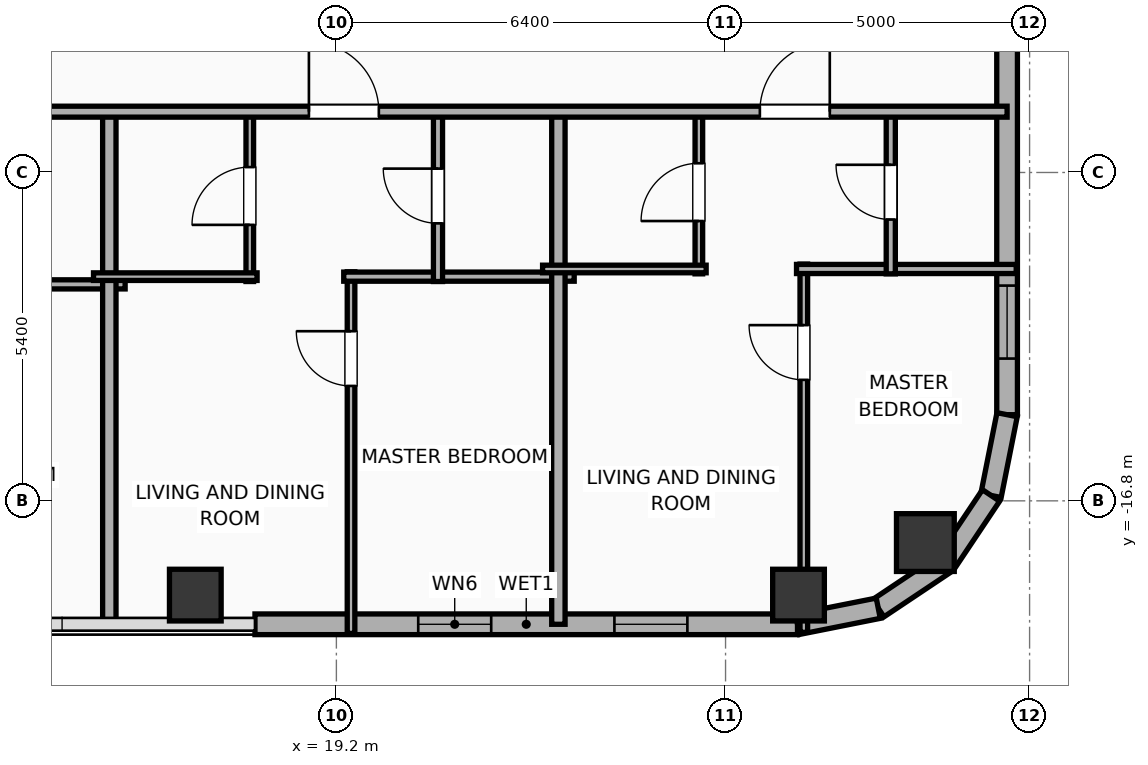
"""IFC4 building model, lengths in metres.
Left out: names, types, materials, properties, quantities, classifications, styles, units other than length and angle.
Written with IfcOpenShell. Run it as: python <this file> out.ifc"""

import sys

from ifc_helpers import new_model, si_unit, direction, frame, frame_2d, origin, origin_2d, place, context, subcontext, project, spatial, rectangle, hollow_rectangle, hollow_circle, extrude, element, fill, save


model = new_model("IFC4")
c1 = context("Model", 3, precision=1e-05, world=origin(), true_north=direction((0.0, 1.0)))
c2 = subcontext(c1, "Body", "Model", "MODEL_VIEW")
j1 = project(units=[si_unit("LENGTHUNIT", "METRE"), si_unit("PLANEANGLEUNIT", "RADIAN")], contexts=[c1])
p1 = place(None, origin())
s1 = spatial("IfcSite", under=j1, at=p1, CompositionType="ELEMENT")
p2 = place(p1, origin())
s2 = spatial("IfcBuilding", under=s1, at=p2, CompositionType="ELEMENT")
p3 = place(p2, frame((0.0, 0.0, 208.0)))
s3 = spatial("IfcBuildingStorey", under=s2, at=p3, CompositionType="ELEMENT", Elevation=208.0)
for number, where, z_axis, x_axis in (
    (1, (16.88, -18.35, 0.0), (0.0, 0.0, 1.0), (1.0, 0.0, 0.0)),
    (2, (26.8, -18.35, 0.0), (0.0, 0.0, 1.0), (1.0, 0.0, 0.0)),
):
    element("IfcColumn", number, at=place(p3, frame(where, z_axis=z_axis, x_axis=x_axis)), inside=s3, PredefinedType="COLUMN", context=c2, shape_type="SweptSolid", body=[
        extrude(hollow_rectangle(XDim=0.85, YDim=0.85, WallThickness=0.028, at=origin_2d()), origin(), (0.0, 0.0, 1.0), 3.9),
    ])
p4 = place(p3, frame((28.886, -17.486, 0.0), z_axis=(0.0, 0.0, 1.0), x_axis=(1.0, 0.0, 0.0)))
e3 = element("IfcColumn", 3, at=p4, inside=s3, PredefinedType="COLUMN", context=c2, shape_type="SweptSolid", body=[
    extrude(hollow_circle(Radius=0.475, WallThickness=0.032, at=origin_2d()), origin(), (0.0, 0.0, 1.0), 3.9),
])
p5 = place(p3, frame((26.783, -18.83, 0.0), z_axis=(0.0, 0.0, 1.0), x_axis=(-1.0, 0.0, 0.0)))
e4 = element("IfcWall", 4, at=p5, inside=s3, PredefinedType="ELEMENTEDWALL", context=c2, shape_type="SweptSolid", body=[
    extrude(rectangle(XDim=8.922, YDim=0.34, at=frame_2d((4.461, 0.0))), origin(), (0.0, 0.0, 1.0), 3.65),
])
p6 = place(p5, frame((5.037, 0.0, 0.75)))
e5 = element("IfcOpeningElement", 5, at=p6, cuts=e4, PredefinedType="OPENING", context=c2, shape_type="SweptSolid", body=[
    extrude(rectangle(XDim=1.2, YDim=2.05, at=frame_2d((0.6, 1.025))), frame((0.0, 0.18, 0.0), z_axis=(0.0, -1.0, 0.0), x_axis=(1.0, 0.0, 0.0)), (0.0, 0.0, 1.0), 0.36),
])
p7 = place(p5, frame((1.811, 0.0, 0.75)))
e6 = element("IfcOpeningElement", 6, at=p7, cuts=e4, PredefinedType="OPENING", context=c2, shape_type="SweptSolid", body=[
    extrude(rectangle(XDim=1.2, YDim=2.05, at=frame_2d((0.6, 1.025))), frame((0.0, 0.18, 0.0), z_axis=(0.0, -1.0, 0.0), x_axis=(1.0, 0.0, 0.0)), (0.0, 0.0, 1.0), 0.36),
])
p8 = place(p3, frame((30.23, 16.583, 0.0), z_axis=(0.0, 0.0, 1.0), x_axis=(0.0, -1.0, 0.0)))
e7 = element("IfcWall", 7, at=p8, inside=s3, PredefinedType="ELEMENTEDWALL", context=c2, shape_type="SweptSolid", body=[
    extrude(rectangle(XDim=31.967, YDim=0.34, at=frame_2d((15.983, 0.0))), origin(), (0.0, 0.0, 1.0), 3.65),
])
p9 = place(p8, frame((29.844, 0.0, 0.75)))
e8 = element("IfcOpeningElement", 8, at=p9, cuts=e7, PredefinedType="OPENING", context=c2, shape_type="SweptSolid", body=[
    extrude(rectangle(XDim=1.2, YDim=2.05, at=frame_2d((0.6, 1.025))), frame((0.0, 0.18, 0.0), z_axis=(0.0, -1.0, 0.0), x_axis=(1.0, 0.0, 0.0)), (0.0, 0.0, 1.0), 0.36),
])
p10 = place(p8, frame((11.488, 0.0, 0.75)))
e9 = element("IfcOpeningElement", 9, at=p10, cuts=e7, PredefinedType="OPENING", context=c2, shape_type="SweptSolid", body=[
    extrude(rectangle(XDim=1.2, YDim=2.05, at=frame_2d((0.6, 1.025))), frame((0.0, 0.18, 0.0), z_axis=(0.0, -1.0, 0.0), x_axis=(1.0, 0.0, 0.0)), (0.0, 0.0, 1.0), 0.36),
])
p11 = place(p8, frame((20.338, 0.0, 0.75)))
e10 = element("IfcOpeningElement", 10, at=p11, cuts=e7, PredefinedType="OPENING", context=c2, shape_type="SweptSolid", body=[
    extrude(rectangle(XDim=1.2, YDim=2.05, at=frame_2d((0.6, 1.025))), frame((0.0, 0.18, 0.0), z_axis=(0.0, -1.0, 0.0), x_axis=(1.0, 0.0, 0.0)), (0.0, 0.0, 1.0), 0.36),
])
p12 = place(p3, frame((30.23, -15.383, 0.0), z_axis=(0.0, 0.0, 1.0), x_axis=(-0.195110379894, -0.98078129043, 0.0)))
e11 = element("IfcWall", 11, at=p12, inside=s3, PredefinedType="ELEMENTEDWALL", context=c2, shape_type="SweptSolid", body=[
    extrude(rectangle(XDim=1.354, YDim=0.34, at=frame_2d((0.677, 0.0))), origin(), (0.0, 0.0, 1.0), 3.65),
])
p13 = place(p3, frame((29.966, -16.711, 0.0), z_axis=(0.0, 0.0, 1.0), x_axis=(-0.555584683399, -0.831459956686, 0.0)))
e12 = element("IfcWall", 12, at=p13, inside=s3, PredefinedType="ELEMENTEDWALL", context=c2, shape_type="SweptSolid", body=[
    extrude(rectangle(XDim=1.337, YDim=0.34, at=frame_2d((0.668, 0.0))), origin(), (0.0, 0.0, 1.0), 3.65),
])
p14 = place(p3, frame((29.223, -17.823, 0.0), z_axis=(0.0, 0.0, 1.0), x_axis=(-0.831403586725, -0.555669034571, 0.0)))
e13 = element("IfcWall", 13, at=p14, inside=s3, PredefinedType="ELEMENTEDWALL", context=c2, shape_type="SweptSolid", body=[
    extrude(rectangle(XDim=1.337, YDim=0.34, at=frame_2d((0.668, 0.0))), origin(), (0.0, 0.0, 1.0), 3.65),
])
p15 = place(p3, frame((28.111, -18.566, 0.0), z_axis=(0.0, 0.0, 1.0), x_axis=(-0.980788153188, -0.195075878998, 0.0)))
e14 = element("IfcWall", 14, at=p15, inside=s3, PredefinedType="ELEMENTEDWALL", context=c2, shape_type="SweptSolid", body=[
    extrude(rectangle(XDim=1.354, YDim=0.34, at=frame_2d((0.677, 0.0))), origin(), (0.0, 0.0, 1.0), 3.65),
])
p16 = place(p3, frame((11.936, -13.24, 0.0), z_axis=(0.0, 0.0, 1.0), x_axis=(1.0, 0.0, 0.0)))
e15 = element("IfcWall", 15, at=p16, inside=s3, PredefinedType="PLUMBINGWALL", context=c2, shape_type="SweptSolid", body=[
    extrude(rectangle(XDim=3.79, YDim=0.15, at=frame_2d((1.895, 0.0))), origin(), (0.0, 0.0, 1.0), 3.65),
])
p17 = place(p3, frame((15.466, -18.83, 0.0), z_axis=(0.0, 0.0, 1.0), x_axis=(0.0, 1.0, 0.0)))
e16 = element("IfcWall", 16, at=p17, inside=s3, PredefinedType="PARTITIONING", context=c2, shape_type="SweptSolid", body=[
    extrude(rectangle(XDim=8.51, YDim=0.22, at=frame_2d((4.255, 0.0))), origin(), (0.0, 0.0, 1.0), 3.65),
])
p18 = place(p3, frame((19.441, -18.98, 0.0), z_axis=(0.0, 0.0, 1.0), x_axis=(0.0, 1.0, 0.0)))
e17 = element("IfcWall", 17, at=p18, inside=s3, PredefinedType="PARTITIONING", context=c2, shape_type="SweptSolid", body=[
    extrude(rectangle(XDim=5.947, YDim=0.125, at=frame_2d((2.974, 0.0))), origin(), (0.0, 0.0, 1.0), 3.65),
])
p19 = place(p18, frame((4.07, 0.0, 0.0)))
e18 = element("IfcOpeningElement", 18, at=p19, cuts=e17, PredefinedType="OPENING", context=c2, shape_type="SweptSolid", body=[
    extrude(rectangle(XDim=0.9, YDim=2.05, at=frame_2d((0.45, 1.025))), frame((0.0, 0.073, 0.0), z_axis=(0.0, -1.0, 0.0), x_axis=(1.0, 0.0, 0.0)), (0.0, 0.0, 1.0), 0.145),
])
p20 = place(p3, frame((19.321, -13.113, 0.0), z_axis=(0.0, 0.0, 1.0), x_axis=(1.0, 0.0, 0.0)))
e19 = element("IfcWall", 19, at=p20, inside=s3, PredefinedType="PLUMBINGWALL", context=c2, shape_type="SweptSolid", body=[
    extrude(rectangle(XDim=3.79, YDim=0.15, at=frame_2d((1.895, 0.0))), origin(), (0.0, 0.0, 1.0), 3.65),
])
p21 = place(p3, frame((17.776, -13.193, 0.0), z_axis=(0.0, 0.0, 1.0), x_axis=(0.0, 1.0, 0.0)))
e20 = element("IfcWall", 20, at=p21, inside=s3, PredefinedType="PARTITIONING", context=c2, shape_type="SweptSolid", body=[
    extrude(rectangle(XDim=2.813, YDim=0.125, at=frame_2d((1.407, 0.0))), origin(), (0.0, 0.0, 1.0), 3.65),
])
p22 = place(p21, frame((0.931, 0.0, 0.0)))
e21 = element("IfcOpeningElement", 21, at=p22, cuts=e20, PredefinedType="OPENING", context=c2, shape_type="SweptSolid", body=[
    extrude(rectangle(XDim=0.95, YDim=2.05, at=frame_2d((0.475, 1.025))), frame((0.0, 0.073, 0.0), z_axis=(0.0, -1.0, 0.0), x_axis=(1.0, 0.0, 0.0)), (0.0, 0.0, 1.0), 0.145),
])
p23 = place(p3, frame((15.206, -13.113, 0.0), z_axis=(0.0, 0.0, 1.0), x_axis=(1.0, 0.0, 0.0)))
e22 = element("IfcWall", 22, at=p23, inside=s3, PredefinedType="PARTITIONING", context=c2, shape_type="SweptSolid", body=[
    extrude(rectangle(XDim=2.69, YDim=0.125, at=frame_2d((1.345, 0.0))), origin(), (0.0, 0.0, 1.0), 3.65),
])
p24 = place(p3, frame((20.871, -13.193, 0.0), z_axis=(0.0, 0.0, 1.0), x_axis=(0.0, 1.0, 0.0)))
e23 = element("IfcWall", 23, at=p24, inside=s3, PredefinedType="PLUMBINGWALL", context=c2, shape_type="SweptSolid", body=[
    extrude(rectangle(XDim=2.813, YDim=0.15, at=frame_2d((1.407, 0.0))), origin(), (0.0, 0.0, 1.0), 3.65),
])
p25 = place(p24, frame((0.957, 0.0, 0.0)))
e24 = element("IfcOpeningElement", 24, at=p25, cuts=e23, PredefinedType="OPENING", context=c2, shape_type="SweptSolid", body=[
    extrude(rectangle(XDim=0.9, YDim=2.05, at=frame_2d((0.45, 1.025))), frame((0.0, 0.085, 0.0), z_axis=(0.0, -1.0, 0.0), x_axis=(1.0, 0.0, 0.0)), (0.0, 0.0, 1.0), 0.17),
])
p26 = place(p3, frame((22.851, -18.83, 0.0), z_axis=(0.0, 0.0, 1.0), x_axis=(0.0, 1.0, 0.0)))
e25 = element("IfcWall", 25, at=p26, inside=s3, PredefinedType="PARTITIONING", context=c2, shape_type="SweptSolid", body=[
    extrude(rectangle(XDim=8.51, YDim=0.22, at=frame_2d((4.255, 0.0))), origin(), (0.0, 0.0, 1.0), 3.65),
])
p27 = place(p3, frame((26.887, -18.962, 0.0), z_axis=(0.0, 0.0, 1.0), x_axis=(0.0, 1.0, 0.0)))
e26 = element("IfcWall", 26, at=p27, inside=s3, PredefinedType="PARTITIONING", context=c2, shape_type="SweptSolid", body=[
    extrude(rectangle(XDim=6.055, YDim=0.125, at=frame_2d((3.028, 0.0))), origin(), (0.0, 0.0, 1.0), 3.65),
])
p28 = place(p27, frame((4.152, 0.0, 0.0)))
e27 = element("IfcOpeningElement", 27, at=p28, cuts=e26, PredefinedType="OPENING", context=c2, shape_type="SweptSolid", body=[
    extrude(rectangle(XDim=0.9, YDim=2.05, at=frame_2d((0.45, 1.025))), frame((0.0, 0.073, 0.0), z_axis=(0.0, -1.0, 0.0), x_axis=(1.0, 0.0, 0.0)), (0.0, 0.0, 1.0), 0.145),
])
p29 = place(p3, frame((26.767, -12.987, 0.0), z_axis=(0.0, 0.0, 1.0), x_axis=(1.0, 0.0, 0.0)))
e28 = element("IfcWall", 28, at=p29, inside=s3, PredefinedType="PLUMBINGWALL", context=c2, shape_type="SweptSolid", body=[
    extrude(rectangle(XDim=3.613, YDim=0.15, at=frame_2d((1.806, 0.0))), origin(), (0.0, 0.0, 1.0), 3.65),
])
p30 = place(p3, frame((25.161, -13.067, 0.0), z_axis=(0.0, 0.0, 1.0), x_axis=(0.0, 1.0, 0.0)))
e29 = element("IfcWall", 29, at=p30, inside=s3, PredefinedType="PARTITIONING", context=c2, shape_type="SweptSolid", body=[
    extrude(rectangle(XDim=2.687, YDim=0.125, at=frame_2d((1.344, 0.0))), origin(), (0.0, 0.0, 1.0), 3.65),
])
p31 = place(p30, frame((0.868, 0.0, 0.0)))
e30 = element("IfcOpeningElement", 30, at=p31, cuts=e29, PredefinedType="OPENING", context=c2, shape_type="SweptSolid", body=[
    extrude(rectangle(XDim=0.95, YDim=2.05, at=frame_2d((0.475, 1.025))), frame((0.0, 0.073, 0.0), z_axis=(0.0, -1.0, 0.0), x_axis=(1.0, 0.0, 0.0)), (0.0, 0.0, 1.0), 0.145),
])
p32 = place(p3, frame((22.591, -12.987, 0.0), z_axis=(0.0, 0.0, 1.0), x_axis=(1.0, 0.0, 0.0)))
e31 = element("IfcWall", 31, at=p32, inside=s3, PredefinedType="PARTITIONING", context=c2, shape_type="SweptSolid", body=[
    extrude(rectangle(XDim=2.69, YDim=0.125, at=frame_2d((1.345, 0.0))), origin(), (0.0, 0.0, 1.0), 3.65),
])
p33 = place(p3, frame((28.317, -13.067, 0.0), z_axis=(0.0, 0.0, 1.0), x_axis=(0.0, 1.0, 0.0)))
e32 = element("IfcWall", 32, at=p33, inside=s3, PredefinedType="PLUMBINGWALL", context=c2, shape_type="SweptSolid", body=[
    extrude(rectangle(XDim=2.687, YDim=0.15, at=frame_2d((1.344, 0.0))), origin(), (0.0, 0.0, 1.0), 3.65),
])
p34 = place(p33, frame((0.894, 0.0, 0.0)))
e33 = element("IfcOpeningElement", 33, at=p34, cuts=e32, PredefinedType="OPENING", context=c2, shape_type="SweptSolid", body=[
    extrude(rectangle(XDim=0.9, YDim=2.05, at=frame_2d((0.45, 1.025))), frame((0.0, 0.085, 0.0), z_axis=(0.0, -1.0, 0.0), x_axis=(1.0, 0.0, 0.0)), (0.0, 0.0, 1.0), 0.17),
])
p35 = place(p3, frame((8.08, -10.4, 0.0), z_axis=(0.0, 0.0, 1.0), x_axis=(1.0, 0.0, 0.0)))
e34 = element("IfcWall", 34, at=p35, inside=s3, PredefinedType="PARTITIONING", context=c2, shape_type="SweptSolid", body=[
    extrude(rectangle(XDim=22.15, YDim=0.18, at=frame_2d((11.075, 0.0))), origin(), (0.0, 0.0, 1.0), 3.65),
])
p36 = place(p35, frame((3.283, 0.0, 0.0)))
e35 = element("IfcOpeningElement", 35, at=p36, cuts=e34, PredefinedType="OPENING", context=c2, shape_type="SweptSolid", body=[
    extrude(rectangle(XDim=1.15, YDim=2.05, at=frame_2d((0.575, 1.025))), frame((0.0, 0.1, 0.0), z_axis=(0.0, -1.0, 0.0), x_axis=(1.0, 0.0, 0.0)), (0.0, 0.0, 1.0), 0.2),
])
p37 = place(p35, frame((10.668, 0.0, 0.0)))
e36 = element("IfcOpeningElement", 36, at=p37, cuts=e34, PredefinedType="OPENING", context=c2, shape_type="SweptSolid", body=[
    extrude(rectangle(XDim=1.15, YDim=2.05, at=frame_2d((0.575, 1.025))), frame((0.0, 0.1, 0.0), z_axis=(0.0, -1.0, 0.0), x_axis=(1.0, 0.0, 0.0)), (0.0, 0.0, 1.0), 0.2),
])
p38 = place(p35, frame((18.084, 0.0, 0.0)))
e37 = element("IfcOpeningElement", 37, at=p38, cuts=e34, PredefinedType="OPENING", context=c2, shape_type="SweptSolid", body=[
    extrude(rectangle(XDim=1.15, YDim=2.05, at=frame_2d((0.575, 1.025))), frame((0.0, 0.1, 0.0), z_axis=(0.0, -1.0, 0.0), x_axis=(1.0, 0.0, 0.0)), (0.0, 0.0, 1.0), 0.2),
])
p39 = place(p6, origin())
e38 = element("IfcWindow", 38, at=p39, inside=s3, PartitioningType="SINGLE_PANEL", PredefinedType="WINDOW", context=c2, shape_type="SweptSolid", body=[
    extrude(rectangle(XDim=1.2, YDim=2.05, at=frame_2d((0.6, 1.025))), frame((0.0, 0.03, 0.0), z_axis=(0.0, -1.0, 0.0), x_axis=(1.0, 0.0, 0.0)), (0.0, 0.0, 1.0), 0.06),
])
fill(e5, e38)
p40 = place(p7, origin())
e39 = element("IfcWindow", 39, at=p40, inside=s3, PartitioningType="SINGLE_PANEL", PredefinedType="WINDOW", context=c2, shape_type="SweptSolid", body=[
    extrude(rectangle(XDim=1.2, YDim=2.05, at=frame_2d((0.6, 1.025))), frame((0.0, 0.03, 0.0), z_axis=(0.0, -1.0, 0.0), x_axis=(1.0, 0.0, 0.0)), (0.0, 0.0, 1.0), 0.06),
])
fill(e6, e39)
p41 = place(p9, origin())
e40 = element("IfcWindow", 40, at=p41, inside=s3, PartitioningType="SINGLE_PANEL", PredefinedType="WINDOW", context=c2, shape_type="SweptSolid", body=[
    extrude(rectangle(XDim=1.2, YDim=2.05, at=frame_2d((0.6, 1.025))), frame((0.0, 0.03, 0.0), z_axis=(0.0, -1.0, 0.0), x_axis=(1.0, 0.0, 0.0)), (0.0, 0.0, 1.0), 0.06),
])
fill(e8, e40)
p42 = place(p19, origin())
e41 = element("IfcDoor", 41, at=p42, inside=s3, OperationType="SINGLE_SWING_RIGHT", PredefinedType="DOOR", context=c2, shape_type="SweptSolid", body=[
    extrude(rectangle(XDim=0.9, YDim=2.05, at=frame_2d((0.45, 1.025))), frame((0.0, 0.025, 0.0), z_axis=(0.0, -1.0, 0.0), x_axis=(1.0, 0.0, 0.0)), (0.0, 0.0, 1.0), 0.05),
])
fill(e18, e41)
p43 = place(p22, origin())
e42 = element("IfcDoor", 42, at=p43, inside=s3, OperationType="SINGLE_SWING_LEFT", PredefinedType="DOOR", context=c2, shape_type="SweptSolid", body=[
    extrude(rectangle(XDim=0.95, YDim=2.05, at=frame_2d((0.475, 1.025))), frame((0.0, 0.025, 0.0), z_axis=(0.0, -1.0, 0.0), x_axis=(1.0, 0.0, 0.0)), (0.0, 0.0, 1.0), 0.05),
])
fill(e21, e42)
p44 = place(p25, origin())
e43 = element("IfcDoor", 43, at=p44, inside=s3, OperationType="SINGLE_SWING_RIGHT", PredefinedType="DOOR", context=c2, shape_type="SweptSolid", body=[
    extrude(rectangle(XDim=0.9, YDim=2.05, at=frame_2d((0.45, 1.025))), frame((0.0, 0.025, 0.0), z_axis=(0.0, -1.0, 0.0), x_axis=(1.0, 0.0, 0.0)), (0.0, 0.0, 1.0), 0.05),
])
fill(e24, e43)
p45 = place(p28, origin())
e44 = element("IfcDoor", 44, at=p45, inside=s3, OperationType="SINGLE_SWING_RIGHT", PredefinedType="DOOR", context=c2, shape_type="SweptSolid", body=[
    extrude(rectangle(XDim=0.9, YDim=2.05, at=frame_2d((0.45, 1.025))), frame((0.0, 0.025, 0.0), z_axis=(0.0, -1.0, 0.0), x_axis=(1.0, 0.0, 0.0)), (0.0, 0.0, 1.0), 0.05),
])
fill(e27, e44)
p46 = place(p31, origin())
e45 = element("IfcDoor", 45, at=p46, inside=s3, OperationType="SINGLE_SWING_LEFT", PredefinedType="DOOR", context=c2, shape_type="SweptSolid", body=[
    extrude(rectangle(XDim=0.95, YDim=2.05, at=frame_2d((0.475, 1.025))), frame((0.0, 0.025, 0.0), z_axis=(0.0, -1.0, 0.0), x_axis=(1.0, 0.0, 0.0)), (0.0, 0.0, 1.0), 0.05),
])
fill(e30, e45)
p47 = place(p34, origin())
e46 = element("IfcDoor", 46, at=p47, inside=s3, OperationType="SINGLE_SWING_RIGHT", PredefinedType="DOOR", context=c2, shape_type="SweptSolid", body=[
    extrude(rectangle(XDim=0.9, YDim=2.05, at=frame_2d((0.45, 1.025))), frame((0.0, 0.025, 0.0), z_axis=(0.0, -1.0, 0.0), x_axis=(1.0, 0.0, 0.0)), (0.0, 0.0, 1.0), 0.05),
])
fill(e33, e46)
p48 = place(p37, origin())
e47 = element("IfcDoor", 47, at=p48, inside=s3, OperationType="SINGLE_SWING_LEFT", PredefinedType="DOOR", context=c2, shape_type="SweptSolid", body=[
    extrude(rectangle(XDim=1.15, YDim=2.05, at=frame_2d((0.575, 1.025))), frame((0.0, 0.025, 0.0), z_axis=(0.0, -1.0, 0.0), x_axis=(1.0, 0.0, 0.0)), (0.0, 0.0, 1.0), 0.05),
])
fill(e36, e47)
p49 = place(p38, origin())
e48 = element("IfcDoor", 48, at=p49, inside=s3, OperationType="SINGLE_SWING_RIGHT", PredefinedType="DOOR", context=c2, shape_type="SweptSolid", body=[
    extrude(rectangle(XDim=1.15, YDim=2.05, at=frame_2d((0.575, 1.025))), frame((0.0, 0.025, 0.0), z_axis=(0.0, -1.0, 0.0), x_axis=(1.0, 0.0, 0.0)), (0.0, 0.0, 1.0), 0.05),
])
fill(e37, e48)
save(model, sys.argv[1])
